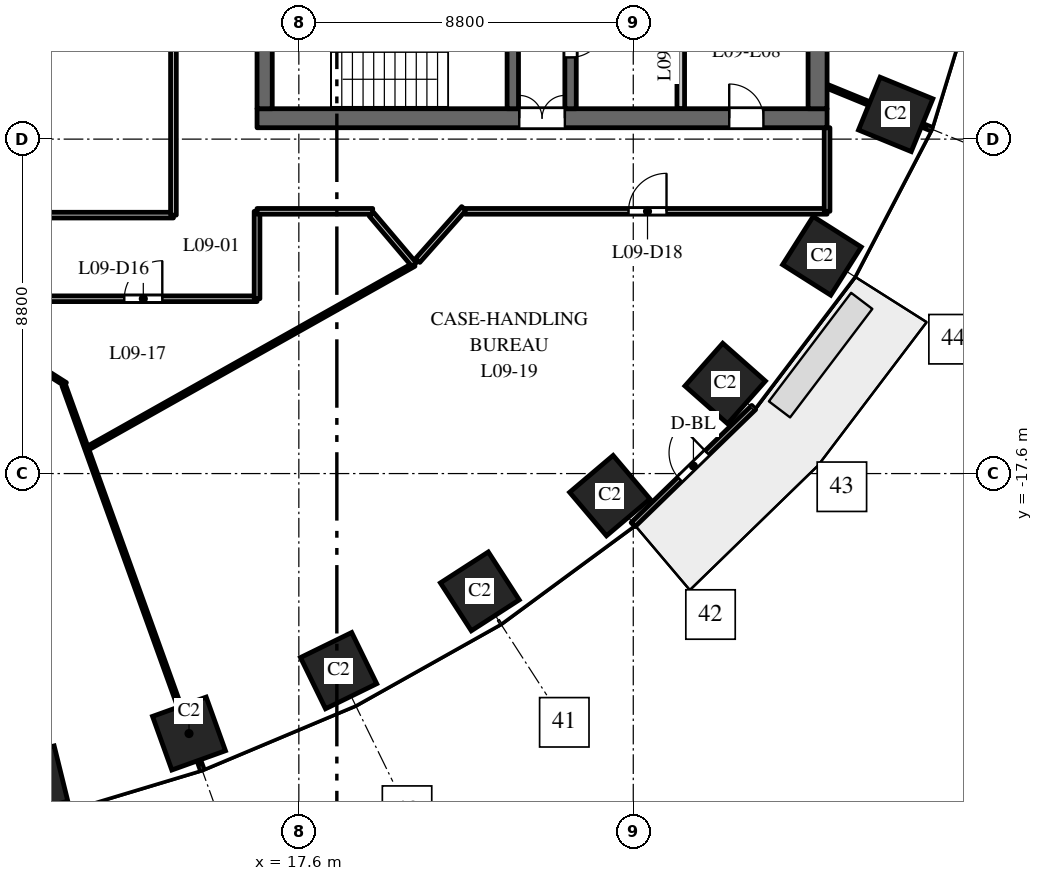
"""IFC4 building model, lengths in metres.
Left out: names, types, materials, properties, quantities, classifications, styles, units other than length and angle.
Written with IfcOpenShell. Run it as: python <this file> out.ifc"""

import sys

from ifc_helpers import new_model, si_unit, direction, frame, frame_2d, origin, origin_2d, place, context, subcontext, project, spatial, rectangle, extrude, element, fill, save


model = new_model("IFC4")
c1 = context("Model", 3, precision=1e-05, world=origin(), true_north=direction((0.0, 1.0)))
c2 = subcontext(c1, "Body", "Model", "MODEL_VIEW")
j1 = project(units=[si_unit("LENGTHUNIT", "METRE"), si_unit("PLANEANGLEUNIT", "RADIAN")], contexts=[c1])
p1 = place(None, origin())
s1 = spatial("IfcSite", under=j1, at=p1, CompositionType="ELEMENT")
p2 = place(p1, origin())
s2 = spatial("IfcBuilding", under=s1, at=p2, CompositionType="ELEMENT")
p3 = place(p2, frame((0.0, 0.0, 46.5)))
s3 = spatial("IfcBuildingStorey", under=s2, at=p3, CompositionType="ELEMENT", Elevation=46.5)
for number, where, z_axis, x_axis in (
    (1, (10.613, -25.674, 0.0), (0.0, 0.0, 1.0), (0.971, 0.24, 0.0)),
    (2, (14.709, -24.441, 0.0), (0.0, 0.0, 1.0), (0.941, 0.338, 0.0)),
    (3, (18.646, -22.785, 0.0), (0.0, 0.0, 1.0), (0.898, 0.439, 0.0)),
    (4, (22.362, -20.7, 0.0), (0.0, 0.0, 1.0), (0.84, 0.542, 0.0)),
    (5, (25.783, -18.18, 0.0), (0.0, 0.0, 1.0), (0.763, 0.646, 0.0)),
    (6, (28.819, -15.23, 0.0), (0.0, 0.0, 1.0), (0.663, 0.749, 0.0)),
    (7, (31.365, -11.871, 0.0), (0.0, 0.0, 1.0), (0.535, 0.845, 0.0)),
    (8, (33.305, -8.149, 0.0), (0.0, 0.0, 1.0), (0.379, 0.925, 0.0)),
):
    element("IfcColumn", number, at=place(p3, frame(where, z_axis=z_axis, x_axis=x_axis)), inside=s3, PredefinedType="COLUMN", context=c2, shape_type="SweptSolid", body=[
        extrude(rectangle(XDim=1.5, YDim=1.5, at=origin_2d()), origin(), (0.0, 0.0, 1.0), 4.0),
    ])
p4 = place(p3, frame((16.5, -8.25, 0.0), z_axis=(0.0, 0.0, 1.0), x_axis=(1.0, 0.0, 0.0)))
e9 = element("IfcWall", 9, at=p4, inside=s3, PredefinedType="SHEAR", context=c2, shape_type="SweptSolid", body=[
    extrude(rectangle(XDim=15.0, YDim=0.5, at=frame_2d((7.5, 0.0))), origin(), (0.0, 0.0, 1.0), 3.7),
])
p5 = place(p4, frame((6.9, 0.0, 0.0)))
e10 = element("IfcOpeningElement", 10, at=p5, cuts=e9, PredefinedType="OPENING", context=c2, shape_type="SweptSolid", body=[
    extrude(rectangle(XDim=1.2, YDim=2.1, at=frame_2d((0.6, 1.05))), frame((0.0, 0.26, 0.0), z_axis=(0.0, -1.0, 0.0), x_axis=(1.0, 0.0, 0.0)), (0.0, 0.0, 1.0), 0.52),
])
p6 = place(p4, frame((12.425, 0.0, 0.0)))
e11 = element("IfcOpeningElement", 11, at=p6, cuts=e9, PredefinedType="OPENING", context=c2, shape_type="SweptSolid", body=[
    extrude(rectangle(XDim=0.9, YDim=2.1, at=frame_2d((0.45, 1.05))), frame((0.0, 0.26, 0.0), z_axis=(0.0, -1.0, 0.0), x_axis=(1.0, 0.0, 0.0)), (0.0, 0.0, 1.0), 0.52),
])
p7 = place(p3, frame((24.75, -8.0, 0.0), z_axis=(0.0, 0.0, 1.0), x_axis=(0.0, 1.0, 0.0)))
e12 = element("IfcWall", 12, at=p7, inside=s3, PredefinedType="SHEAR", context=c2, shape_type="SweptSolid", body=[
    extrude(rectangle(XDim=16.0, YDim=0.3, at=frame_2d((8.0, 0.0))), origin(), (0.0, 0.0, 1.0), 3.7),
])
p8 = place(p7, frame((4.425, 0.0, 0.0)))
e13 = element("IfcOpeningElement", 13, at=p8, cuts=e12, PredefinedType="OPENING", context=c2, shape_type="SweptSolid", body=[
    extrude(rectangle(XDim=1.1, YDim=2.1, at=frame_2d((0.55, 1.05))), frame((0.0, 0.16, 0.0), z_axis=(0.0, -1.0, 0.0), x_axis=(1.0, 0.0, 0.0)), (0.0, 0.0, 1.0), 0.32),
])
p9 = place(p7, frame((7.45, 0.0, 0.0)))
e14 = element("IfcOpeningElement", 14, at=p9, cuts=e12, PredefinedType="OPENING", context=c2, shape_type="SweptSolid", body=[
    extrude(rectangle(XDim=1.1, YDim=2.1, at=frame_2d((0.55, 1.05))), frame((0.0, 0.16, 0.0), z_axis=(0.0, -1.0, 0.0), x_axis=(1.0, 0.0, 0.0)), (0.0, 0.0, 1.0), 0.32),
])
p10 = place(p7, frame((10.425, 0.0, 0.0)))
e15 = element("IfcOpeningElement", 15, at=p10, cuts=e12, PredefinedType="OPENING", context=c2, shape_type="SweptSolid", body=[
    extrude(rectangle(XDim=1.2, YDim=2.1, at=frame_2d((0.6, 1.05))), frame((0.0, 0.16, 0.0), z_axis=(0.0, -1.0, 0.0), x_axis=(1.0, 0.0, 0.0)), (0.0, 0.0, 1.0), 0.32),
])
p11 = place(p7, frame((13.75, 0.0, 0.0)))
e16 = element("IfcOpeningElement", 16, at=p11, cuts=e12, PredefinedType="OPENING", context=c2, shape_type="SweptSolid", body=[
    extrude(rectangle(XDim=0.9, YDim=2.1, at=frame_2d((0.45, 1.05))), frame((0.0, 0.16, 0.0), z_axis=(0.0, -1.0, 0.0), x_axis=(1.0, 0.0, 0.0)), (0.0, 0.0, 1.0), 0.32),
])
p12 = place(p7, frame((1.35, 0.0, 0.0)))
e17 = element("IfcOpeningElement", 17, at=p12, cuts=e12, PredefinedType="OPENING", context=c2, shape_type="SweptSolid", body=[
    extrude(rectangle(XDim=0.9, YDim=2.1, at=frame_2d((0.45, 1.05))), frame((0.0, 0.16, 0.0), z_axis=(0.0, -1.0, 0.0), x_axis=(1.0, 0.0, 0.0)), (0.0, 0.0, 1.0), 0.32),
])
p13 = place(p3, frame((16.7, -8.0, 0.0), z_axis=(0.0, 0.0, 1.0), x_axis=(0.0, 1.0, 0.0)))
e18 = element("IfcWall", 18, at=p13, inside=s3, PredefinedType="SHEAR", context=c2, shape_type="SweptSolid", body=[
    extrude(rectangle(XDim=16.0, YDim=0.4, at=frame_2d((8.0, 0.0))), origin(), (0.0, 0.0, 1.0), 3.7),
])
p14 = place(p3, frame((31.25, -8.0, 0.0), z_axis=(0.0, 0.0, 1.0), x_axis=(0.0, 1.0, 0.0)))
e19 = element("IfcWall", 19, at=p14, inside=s3, PredefinedType="SHEAR", context=c2, shape_type="SweptSolid", body=[
    extrude(rectangle(XDim=16.0, YDim=0.5, at=frame_2d((8.0, 0.0))), origin(), (0.0, 0.0, 1.0), 3.7),
])
p15 = place(p3, frame((27.65, -8.0, 0.0), z_axis=(0.0, 0.0, 1.0), x_axis=(0.0, 1.0, 0.0)))
e20 = element("IfcWall", 20, at=p15, inside=s3, PredefinedType="PARTITIONING", context=c2, shape_type="SweptSolid", body=[
    extrude(rectangle(XDim=3.25, YDim=0.2, at=frame_2d((1.625, 0.0))), origin(), (0.0, 0.0, 1.0), 3.7),
])
p16 = place(p3, frame((23.23, -8.0, 0.0), z_axis=(0.0, 0.0, 1.0), x_axis=(0.0, 1.0, 0.0)))
e21 = element("IfcWall", 21, at=p16, inside=s3, PredefinedType="SHEAR", context=c2, shape_type="SweptSolid", body=[
    extrude(rectangle(XDim=7.875, YDim=0.3, at=frame_2d((3.938, 0.0))), origin(), (0.0, 0.0, 1.0), 3.7),
])
p17 = place(p16, frame((5.15, 0.0, 0.0)))
e22 = element("IfcOpeningElement", 22, at=p17, cuts=e21, PredefinedType="OPENING", context=c2, shape_type="SweptSolid", body=[
    extrude(rectangle(XDim=1.1, YDim=2.1, at=frame_2d((0.55, 1.05))), frame((0.0, 0.16, 0.0), z_axis=(0.0, -1.0, 0.0), x_axis=(1.0, 0.0, 0.0)), (0.0, 0.0, 1.0), 0.32),
])
p18 = place(p3, frame((26.396, -18.943, 0.0), z_axis=(0.0, 0.0, 1.0), x_axis=(0.717214761864, 0.696852197647, 0.0)))
e23 = element("IfcWall", 23, at=p18, inside=s3, PredefinedType="STANDARD", context=c2, shape_type="SweptSolid", body=[
    extrude(rectangle(XDim=4.424, YDim=0.15, at=frame_2d((2.212, 0.0))), origin(), (0.0, 0.0, 1.0), 3.7),
])
p19 = place(p18, frame((1.712, 0.0, 0.0)))
e24 = element("IfcOpeningElement", 24, at=p19, cuts=e23, PredefinedType="OPENING", context=c2, shape_type="SweptSolid", body=[
    extrude(rectangle(XDim=1.0, YDim=2.4, at=frame_2d((0.5, 1.2))), frame((0.0, 0.085, 0.0), z_axis=(0.0, -1.0, 0.0), x_axis=(1.0, 0.0, 0.0)), (0.0, 0.0, 1.0), 0.17),
])
p20 = place(p3, frame((-14.3, -10.8, 0.0), z_axis=(0.0, 0.0, 1.0), x_axis=(1.0, 0.0, 0.0)))
e25 = element("IfcWall", 25, at=p20, inside=s3, PredefinedType="PARTITIONING", context=c2, shape_type="SweptSolid", body=[
    extrude(rectangle(XDim=28.6, YDim=0.15, at=frame_2d((14.3, 0.0))), origin(), (0.0, 0.0, 1.0), 2.85),
])
p21 = place(p20, frame((11.4, 0.0, 0.0)))
e26 = element("IfcOpeningElement", 26, at=p21, cuts=e25, PredefinedType="OPENING", context=c2, shape_type="SweptSolid", body=[
    extrude(rectangle(XDim=1.0, YDim=2.1, at=frame_2d((0.5, 1.05))), frame((0.0, 0.085, 0.0), z_axis=(0.0, -1.0, 0.0), x_axis=(1.0, 0.0, 0.0)), (0.0, 0.0, 1.0), 0.17),
])
p22 = place(p20, frame((16.167, 0.0, 0.0)))
e27 = element("IfcOpeningElement", 27, at=p22, cuts=e25, PredefinedType="OPENING", context=c2, shape_type="SweptSolid", body=[
    extrude(rectangle(XDim=1.0, YDim=2.1, at=frame_2d((0.5, 1.05))), frame((0.0, 0.085, 0.0), z_axis=(0.0, -1.0, 0.0), x_axis=(1.0, 0.0, 0.0)), (0.0, 0.0, 1.0), 0.17),
])
p23 = place(p3, frame((10.137, -14.413, 0.0), z_axis=(0.0, 0.0, 1.0), x_axis=(0.844849680057, -0.535003755228, 0.0)))
e28 = element("IfcWall", 28, at=p23, inside=s3, PredefinedType="PARTITIONING", context=c2, shape_type="SweptSolid", body=[
    extrude(rectangle(XDim=1.562, YDim=0.1, at=frame_2d((0.781, 0.0))), origin(), (0.0, 0.0, 1.0), 3.7),
])
p24 = place(p3, frame((10.607, -13.0, 0.0), z_axis=(0.0, 0.0, 1.0), x_axis=(1.0, 0.0, 0.0)))
e29 = element("IfcWall", 29, at=p24, inside=s3, PredefinedType="PARTITIONING", context=c2, shape_type="SweptSolid", body=[
    extrude(rectangle(XDim=5.893, YDim=0.15, at=frame_2d((2.947, 0.0))), origin(), (0.0, 0.0, 1.0), 3.7),
])
p25 = place(p24, frame((2.4, 0.0, 0.0)))
e30 = element("IfcOpeningElement", 30, at=p25, cuts=e29, PredefinedType="OPENING", context=c2, shape_type="SweptSolid", body=[
    extrude(rectangle(XDim=1.0, YDim=2.1, at=frame_2d((0.5, 1.05))), frame((0.0, 0.085, 0.0), z_axis=(0.0, -1.0, 0.0), x_axis=(1.0, 0.0, 0.0)), (0.0, 0.0, 1.0), 0.17),
])
p26 = place(p3, frame((11.416, -15.282, 0.0), z_axis=(0.0, 0.0, 1.0), x_axis=(0.338824973611, -0.940849423265, 0.0)))
e31 = element("IfcWall", 31, at=p26, inside=s3, PredefinedType="PARTITIONING", context=c2, shape_type="SweptSolid", body=[
    extrude(rectangle(XDim=10.734, YDim=0.1, at=frame_2d((5.367, 0.0))), origin(), (0.0, 0.0, 1.0), 3.7),
])
p27 = place(p3, frame((12.06, -16.924, 0.0), z_axis=(0.0, 0.0, 1.0), x_axis=(0.871521837039, 0.490356694218, 0.0)))
e32 = element("IfcWall", 32, at=p27, inside=s3, PredefinedType="PARTITIONING", context=c2, shape_type="SweptSolid", body=[
    extrude(rectangle(XDim=9.836, YDim=0.1, at=frame_2d((4.918, 0.0))), origin(), (0.0, 0.0, 1.0), 3.7),
])
p28 = place(p3, frame((14.3, -10.8, 0.0), z_axis=(0.0, 0.0, 1.0), x_axis=(0.0, 1.0, 0.0)))
e33 = element("IfcWall", 33, at=p28, inside=s3, PredefinedType="PARTITIONING", context=c2, shape_type="SweptSolid", body=[
    extrude(rectangle(XDim=21.6, YDim=0.15, at=frame_2d((10.8, 0.0))), origin(), (0.0, 0.0, 1.0), 2.75),
])
p29 = place(p28, frame((10.2, 0.0, 0.0)))
e34 = element("IfcOpeningElement", 34, at=p29, cuts=e33, PredefinedType="OPENING", context=c2, shape_type="SweptSolid", body=[
    extrude(rectangle(XDim=1.0, YDim=2.1, at=frame_2d((0.5, 1.05))), frame((0.0, 0.085, 0.0), z_axis=(0.0, -1.0, 0.0), x_axis=(1.0, 0.0, 0.0)), (0.0, 0.0, 1.0), 0.17),
])
p30 = place(p3, frame((16.5, -13.0, 0.0), z_axis=(0.0, 0.0, 1.0), x_axis=(0.0, 1.0, 0.0)))
e35 = element("IfcWall", 35, at=p30, inside=s3, PredefinedType="PARTITIONING", context=c2, shape_type="SweptSolid", body=[
    extrude(rectangle(XDim=2.3, YDim=0.15, at=frame_2d((1.15, 0.0))), origin(), (0.0, 0.0, 1.0), 3.7),
])
p31 = place(p3, frame((16.5, -10.7, 0.0), z_axis=(0.0, 0.0, 1.0), x_axis=(1.0, 0.0, 0.0)))
e36 = element("IfcWall", 36, at=p31, inside=s3, PredefinedType="PARTITIONING", context=c2, shape_type="SweptSolid", body=[
    extrude(rectangle(XDim=3.043, YDim=0.15, at=frame_2d((1.521, 0.0))), origin(), (0.0, 0.0, 1.0), 3.7),
])
p32 = place(p3, frame((19.511, -10.778, 0.0), z_axis=(0.0, 0.0, 1.0), x_axis=(0.646491141339, -0.762921492796, 0.0)))
e37 = element("IfcWall", 37, at=p32, inside=s3, PredefinedType="PARTITIONING", context=c2, shape_type="SweptSolid", body=[
    extrude(rectangle(XDim=1.734, YDim=0.15, at=frame_2d((0.867, 0.0))), origin(), (0.0, 0.0, 1.0), 3.7),
])
p33 = place(p3, frame((20.727, -11.994, 0.0), z_axis=(0.0, 0.0, 1.0), x_axis=(0.663767495264, 0.747938976275, 0.0)))
e38 = element("IfcWall", 38, at=p33, inside=s3, PredefinedType="PARTITIONING", context=c2, shape_type="SweptSolid", body=[
    extrude(rectangle(XDim=1.83, YDim=0.15, at=frame_2d((0.915, 0.0))), origin(), (0.0, 0.0, 1.0), 2.75),
])
p34 = place(p3, frame((21.975, -10.7, 0.0), z_axis=(0.0, 0.0, 1.0), x_axis=(1.0, 0.0, 0.0)))
e39 = element("IfcWall", 39, at=p34, inside=s3, PredefinedType="PARTITIONING", context=c2, shape_type="SweptSolid", body=[
    extrude(rectangle(XDim=9.525, YDim=0.15, at=frame_2d((4.762, 0.0))), origin(), (0.0, 0.0, 1.0), 2.85),
])
p35 = place(p34, frame((4.3, 0.0, 0.0)))
e40 = element("IfcOpeningElement", 40, at=p35, cuts=e39, PredefinedType="OPENING", context=c2, shape_type="SweptSolid", body=[
    extrude(rectangle(XDim=1.0, YDim=2.1, at=frame_2d((0.5, 1.05))), frame((0.0, 0.085, 0.0), z_axis=(0.0, -1.0, 0.0), x_axis=(1.0, 0.0, 0.0)), (0.0, 0.0, 1.0), 0.17),
])
p36 = place(p3, frame((31.5, -10.7, 0.0), z_axis=(0.0, 0.0, 1.0), x_axis=(0.0, 1.0, 0.0)))
e41 = element("IfcWall", 41, at=p36, inside=s3, PredefinedType="PARTITIONING", context=c2, shape_type="SweptSolid", body=[
    extrude(rectangle(XDim=2.2, YDim=0.15, at=frame_2d((1.1, 0.0))), origin(), (0.0, 0.0, 1.0), 2.85),
])
p37 = place(p3, frame((31.5, -7.41, 0.0), z_axis=(0.0, 0.0, 1.0), x_axis=(0.925344112436, -0.379128307542, 0.0)))
e42 = element("IfcWall", 42, at=p37, inside=s3, PredefinedType="PARTITIONING", context=c2, shape_type="SweptSolid", body=[
    extrude(rectangle(XDim=2.954, YDim=0.1, at=frame_2d((1.477, 0.0))), origin(), (0.0, 0.0, 1.0), 3.7),
])
p38 = place(p5, origin())
e43 = element("IfcDoor", 43, at=p38, inside=s3, OperationType="DOUBLE_DOOR_DOUBLE_SWING", PredefinedType="DOOR", context=c2, shape_type="SweptSolid", body=[
    extrude(rectangle(XDim=1.2, YDim=2.1, at=frame_2d((0.6, 1.05))), frame((0.0, 0.025, 0.0), z_axis=(0.0, -1.0, 0.0), x_axis=(1.0, 0.0, 0.0)), (0.0, 0.0, 1.0), 0.05),
])
fill(e10, e43)
p39 = place(p12, origin())
e44 = element("IfcDoor", 44, at=p39, inside=s3, OperationType="SINGLE_SWING_RIGHT", PredefinedType="DOOR", context=c2, shape_type="SweptSolid", body=[
    extrude(rectangle(XDim=0.9, YDim=2.1, at=frame_2d((0.45, 1.05))), frame((0.0, 0.025, 0.0), z_axis=(0.0, -1.0, 0.0), x_axis=(1.0, 0.0, 0.0)), (0.0, 0.0, 1.0), 0.05),
])
fill(e17, e44)
p40 = place(p6, origin())
e45 = element("IfcDoor", 45, at=p40, inside=s3, OperationType="SINGLE_SWING_RIGHT", PredefinedType="DOOR", context=c2, shape_type="SweptSolid", body=[
    extrude(rectangle(XDim=0.9, YDim=2.1, at=frame_2d((0.45, 1.05))), frame((0.0, 0.025, 0.0), z_axis=(0.0, -1.0, 0.0), x_axis=(1.0, 0.0, 0.0)), (0.0, 0.0, 1.0), 0.05),
])
fill(e11, e45)
p41 = place(p19, origin())
e46 = element("IfcDoor", 46, at=p41, inside=s3, OperationType="SINGLE_SWING_RIGHT", PredefinedType="DOOR", context=c2, shape_type="SweptSolid", body=[
    extrude(rectangle(XDim=1.0, YDim=2.4, at=frame_2d((0.5, 1.2))), frame((0.0, 0.025, 0.0), z_axis=(0.0, -1.0, 0.0), x_axis=(1.0, 0.0, 0.0)), (0.0, 0.0, 1.0), 0.05),
])
fill(e24, e46)
p42 = place(p25, origin())
e47 = element("IfcDoor", 47, at=p42, inside=s3, OperationType="SINGLE_SWING_RIGHT", PredefinedType="DOOR", context=c2, shape_type="SweptSolid", body=[
    extrude(rectangle(XDim=1.0, YDim=2.1, at=frame_2d((0.5, 1.05))), frame((0.0, 0.025, 0.0), z_axis=(0.0, -1.0, 0.0), x_axis=(1.0, 0.0, 0.0)), (0.0, 0.0, 1.0), 0.05),
])
fill(e30, e47)
p43 = place(p35, origin())
e48 = element("IfcDoor", 48, at=p43, inside=s3, OperationType="SINGLE_SWING_RIGHT", PredefinedType="DOOR", context=c2, shape_type="SweptSolid", body=[
    extrude(rectangle(XDim=1.0, YDim=2.1, at=frame_2d((0.5, 1.05))), frame((0.0, 0.025, 0.0), z_axis=(0.0, -1.0, 0.0), x_axis=(1.0, 0.0, 0.0)), (0.0, 0.0, 1.0), 0.05),
])
fill(e40, e48)
save(model, sys.argv[1])
